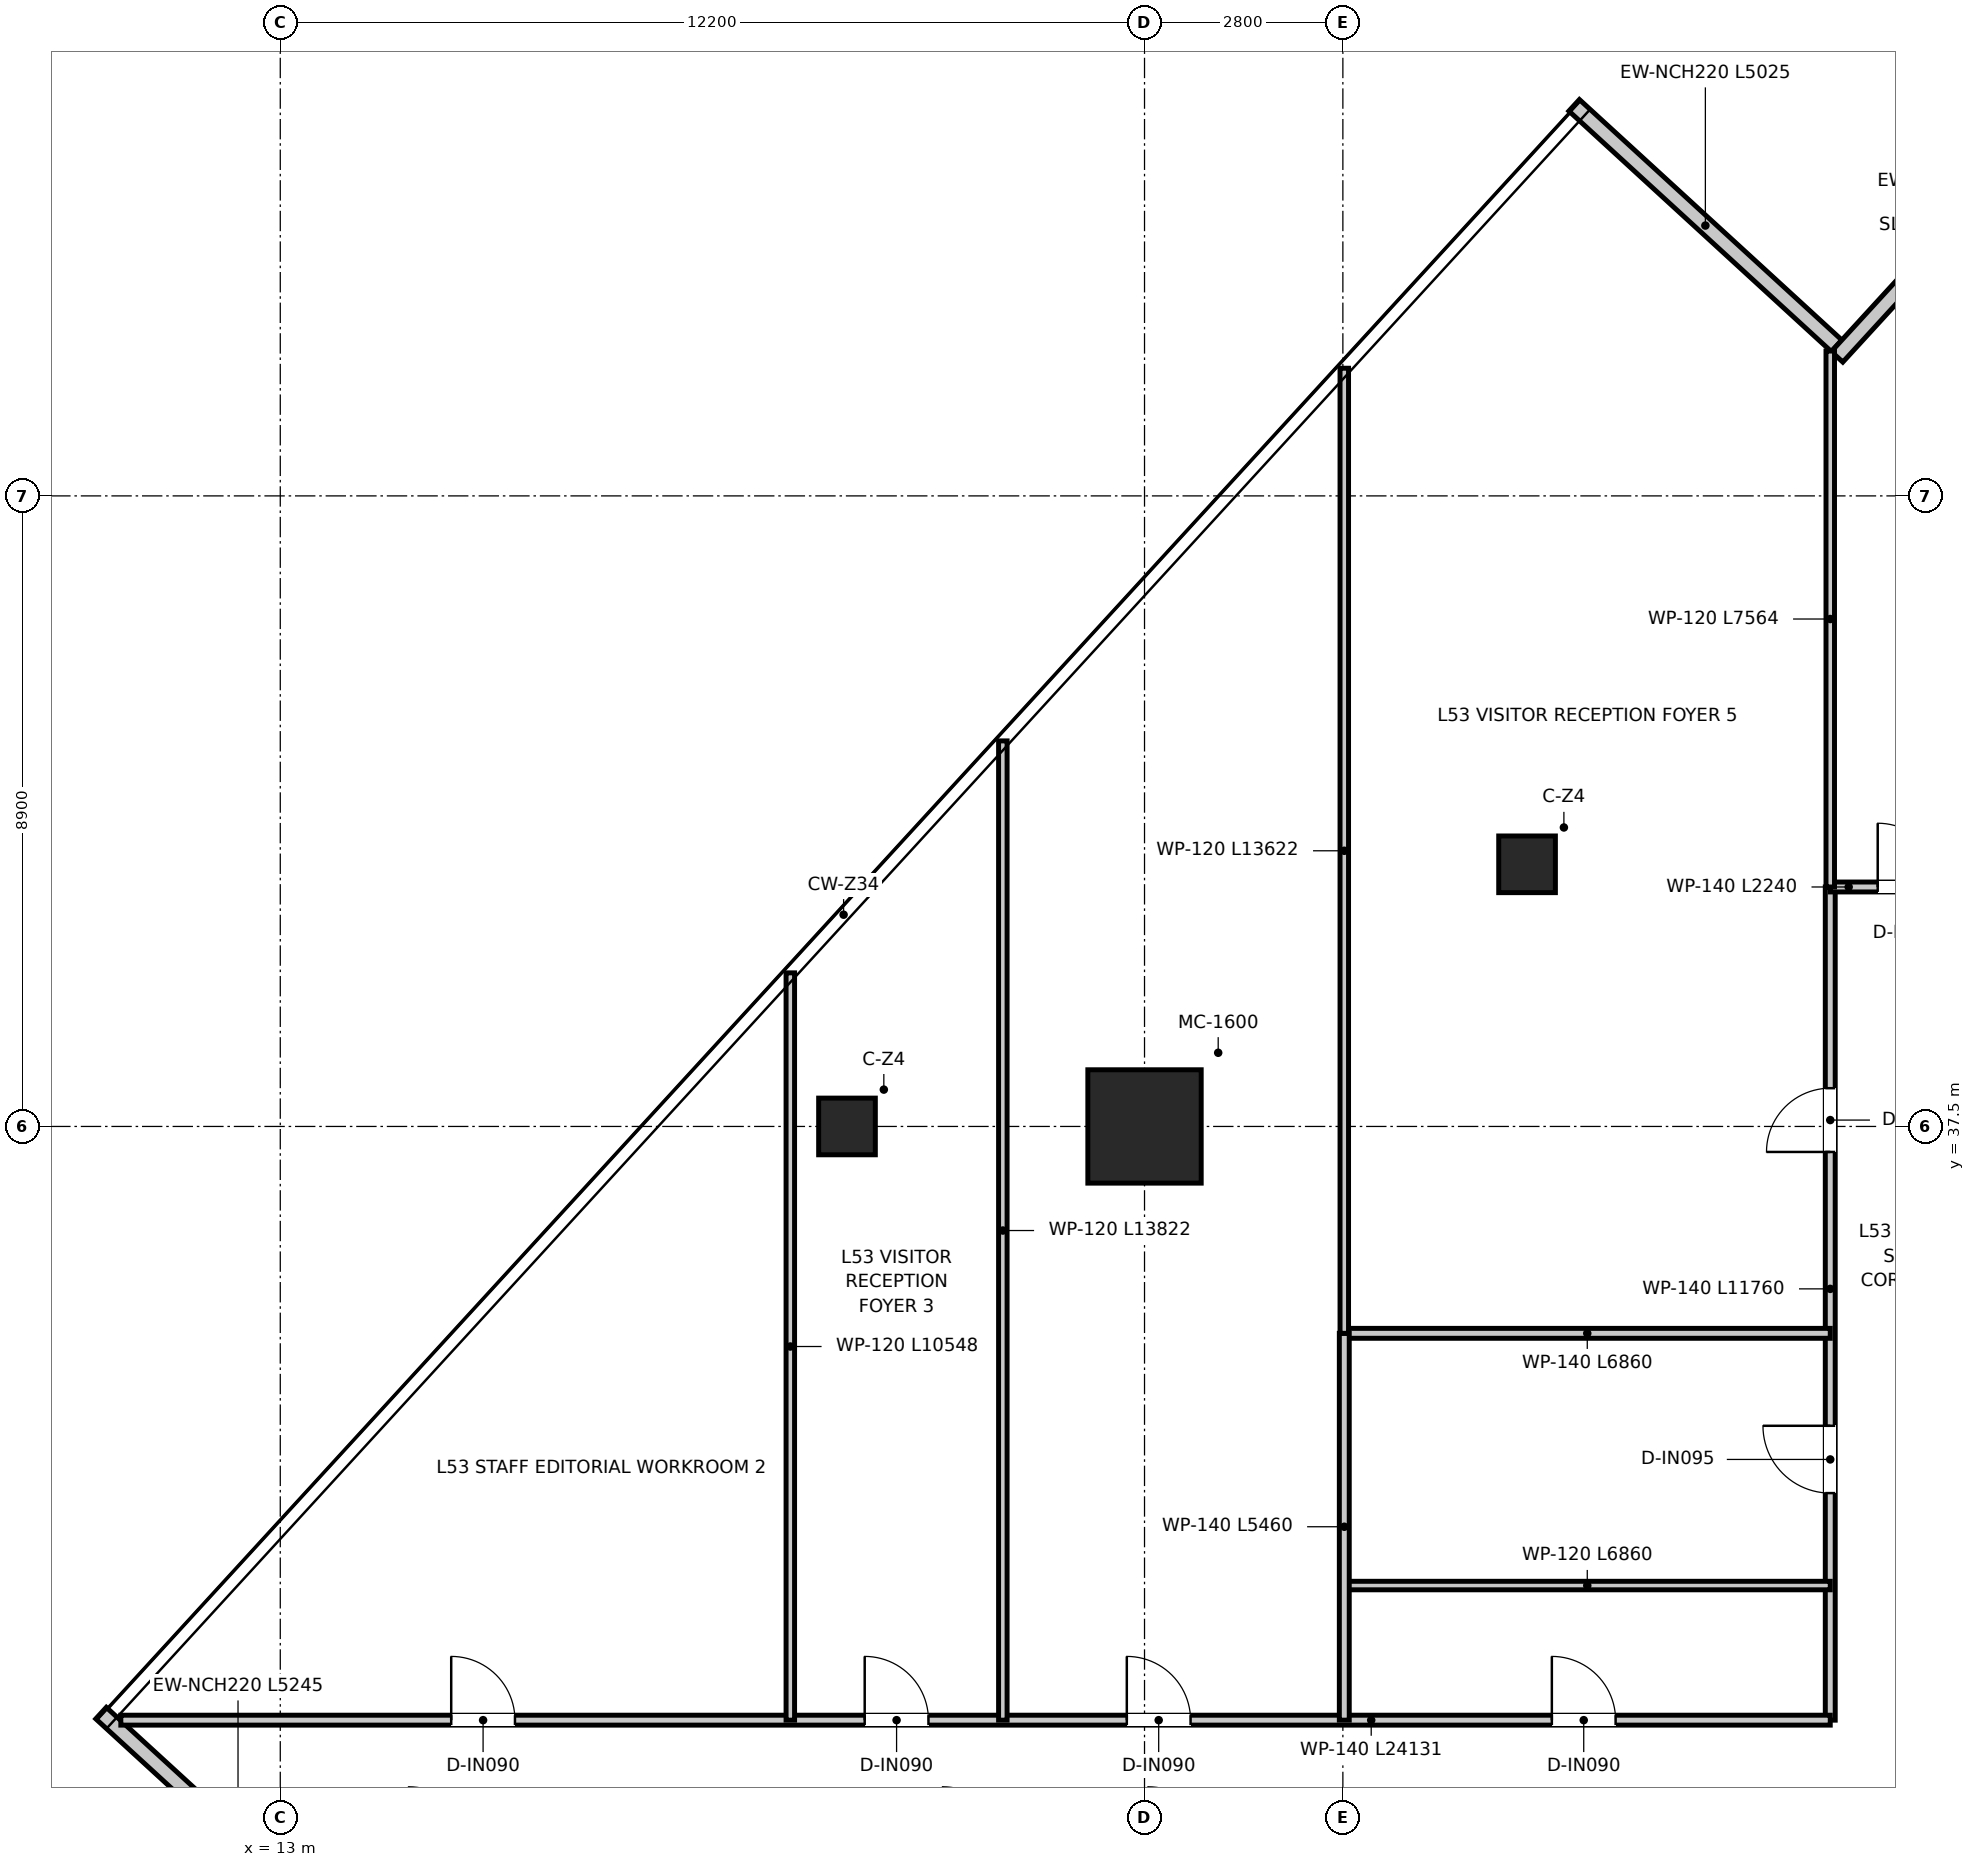
"""IFC4 building model, lengths in metres.
Left out: names, types, materials, properties, quantities, classifications, styles, units other than length and angle.
Written with IfcOpenShell. Run it as: python <this file> out.ifc"""

import sys

from ifc_helpers import new_model, si_unit, direction, frame, frame_2d, origin, origin_2d, place, context, subcontext, project, spatial, rectangle, extrude, source, transform, mapped, element, fill, save


model = new_model("IFC4")
c1 = context("Model", 3, precision=1e-05, world=origin(), true_north=direction((0.0, 1.0)))
c2 = subcontext(c1, "Body", "Model", "MODEL_VIEW")
j1 = project(units=[si_unit("LENGTHUNIT", "METRE"), si_unit("PLANEANGLEUNIT", "RADIAN")], contexts=[c1])
p1 = place(None, origin())
s1 = spatial("IfcSite", under=j1, at=p1, CompositionType="ELEMENT")
p2 = place(p1, origin())
s2 = spatial("IfcBuilding", under=s1, at=p2, CompositionType="ELEMENT")
p3 = place(p2, frame((0.0, 0.0, 219.15)))
s3 = spatial("IfcBuildingStorey", under=s2, at=p3, CompositionType="ELEMENT", Elevation=219.15)
m1 = source(origin(), c2, "Body", "SweptSolid", [
    extrude(rectangle(XDim=1.6, YDim=1.6, at=origin_2d()), origin(), (0.0, 0.0, 1.0), 3.95),
])
p4 = place(p3, frame((25.2, 37.5, 0.0), z_axis=(0.0, 0.0, 1.0), x_axis=(1.0, 0.0, 0.0)))
e1 = element("IfcColumn", 1, at=p4, inside=s3, PredefinedType="USERDEFINED", context=c2, shape_type="MappedRepresentation", body=[
    mapped(m1, transform((0.0, 0.0, 0.0), x_axis=(1.0, 0.0, 0.0), y_axis=(0.0, 1.0, 0.0), z_axis=(0.0, 0.0, 1.0), scale=1.0)),
])
m2 = source(origin(), c2, "Body", "SweptSolid", [
    extrude(rectangle(XDim=0.8, YDim=0.8, at=origin_2d()), origin(), (0.0, 0.0, 1.0), 3.95),
])
for number, where, z_axis, x_axis in (
    (2, (21.0, 37.5, 0.0), (0.0, 0.0, 1.0), (1.0, 0.0, 0.0)),
    (3, (30.6, 41.2, 0.0), (0.0, 0.0, 1.0), (1.0, 0.0, 0.0)),
):
    element("IfcColumn", number, at=place(p3, frame(where, z_axis=z_axis, x_axis=x_axis)), inside=s3, PredefinedType="COLUMN", context=c2, shape_type="MappedRepresentation", body=[
        mapped(m2, transform((0.0, 0.0, 0.0), x_axis=(1.0, 0.0, 0.0), y_axis=(0.0, 1.0, 0.0), z_axis=(0.0, 0.0, 1.0), scale=1.0)),
    ])
p5 = place(p3, frame((34.969, 48.518, 0.0), z_axis=(0.0, 0.0, 1.0), x_axis=(-0.737285215553, 0.675581609375, 0.0)))
e4 = element("IfcWall", 4, at=p5, inside=s3, PredefinedType="ELEMENTEDWALL", context=c2, shape_type="SweptSolid", body=[
    extrude(rectangle(XDim=5.025, YDim=0.22, at=frame_2d((2.512, 0.0))), origin(), (0.0, 0.0, 1.0), 3.67),
])
p6 = place(p3, frame((10.47, 29.22, 0.0), z_axis=(0.0, 0.0, 1.0), x_axis=(0.737293236511, -0.675572855727, 0.0)))
e5 = element("IfcWall", 5, at=p6, inside=s3, PredefinedType="ELEMENTEDWALL", context=c2, shape_type="SweptSolid", body=[
    extrude(rectangle(XDim=5.245, YDim=0.22, at=frame_2d((2.623, 0.0))), origin(), (0.0, 0.0, 1.0), 3.67),
])
p7 = place(p3, frame((38.52, 52.23, 0.0), z_axis=(0.0, 0.0, 1.0), x_axis=(-0.675596040677, -0.737271991752, 0.0)))
e6 = element("IfcWall", 6, at=p7, inside=s3, PredefinedType="ELEMENTEDWALL", context=c2, shape_type="SweptSolid", body=[
    extrude(rectangle(XDim=5.245, YDim=0.22, at=frame_2d((2.623, 0.0))), origin(), (0.0, 0.0, 1.0), 3.67),
])
p8 = place(p3, frame((34.88, 29.12, 0.0), z_axis=(0.0, 0.0, 1.0), x_axis=(0.0, 1.0, 0.0)))
e7 = element("IfcWall", 7, at=p8, inside=s3, PredefinedType="PARTITIONING", context=c2, shape_type="SweptSolid", body=[
    extrude(rectangle(XDim=11.76, YDim=0.14, at=frame_2d((5.88, 0.0))), origin(), (0.0, 0.0, 1.0), 3.03),
])
p9 = place(p8, frame((3.205, 0.0, 0.0)))
e8 = element("IfcOpeningElement", 8, at=p9, cuts=e7, PredefinedType="OPENING", context=c2, shape_type="SweptSolid", body=[
    extrude(rectangle(XDim=0.95, YDim=2.1, at=frame_2d((0.475, 1.05))), frame((0.0, 0.08, 0.0), z_axis=(0.0, -1.0, 0.0), x_axis=(1.0, 0.0, 0.0)), (0.0, 0.0, 1.0), 0.16),
])
p10 = place(p8, frame((8.02, 0.0, 0.0)))
e9 = element("IfcOpeningElement", 9, at=p10, cuts=e7, PredefinedType="OPENING", context=c2, shape_type="SweptSolid", body=[
    extrude(rectangle(XDim=0.9, YDim=2.1, at=frame_2d((0.45, 1.05))), frame((0.0, 0.08, 0.0), z_axis=(0.0, -1.0, 0.0), x_axis=(1.0, 0.0, 0.0)), (0.0, 0.0, 1.0), 0.16),
])
p11 = place(p3, frame((34.88, 40.88, 0.0), z_axis=(0.0, 0.0, 1.0), x_axis=(1.0, 0.0, 0.0)))
e10 = element("IfcWall", 10, at=p11, inside=s3, PredefinedType="PARTITIONING", context=c2, shape_type="SweptSolid", body=[
    extrude(rectangle(XDim=2.24, YDim=0.14, at=frame_2d((1.12, 0.0))), origin(), (0.0, 0.0, 1.0), 3.67),
])
p12 = place(p11, frame((0.67, 0.0, 0.0)))
e11 = element("IfcOpeningElement", 11, at=p12, cuts=e10, PredefinedType="OPENING", context=c2, shape_type="SweptSolid", body=[
    extrude(rectangle(XDim=0.9, YDim=2.1, at=frame_2d((0.45, 1.05))), frame((0.0, 0.08, 0.0), z_axis=(0.0, -1.0, 0.0), x_axis=(1.0, 0.0, 0.0)), (0.0, 0.0, 1.0), 0.16),
])
p13 = place(p3, frame((10.749, 29.12, 0.0), z_axis=(0.0, 0.0, 1.0), x_axis=(1.0, 0.0, 0.0)))
e12 = element("IfcWall", 12, at=p13, inside=s3, PredefinedType="PARTITIONING", context=c2, shape_type="SweptSolid", body=[
    extrude(rectangle(XDim=24.131, YDim=0.14, at=frame_2d((12.065, 0.0))), origin(), (0.0, 0.0, 1.0), 3.03),
])
p14 = place(p13, frame((20.201, 0.0, 0.0)))
e13 = element("IfcOpeningElement", 13, at=p14, cuts=e12, PredefinedType="OPENING", context=c2, shape_type="SweptSolid", body=[
    extrude(rectangle(XDim=0.9, YDim=2.1, at=frame_2d((0.45, 1.05))), frame((0.0, 0.08, 0.0), z_axis=(0.0, -1.0, 0.0), x_axis=(1.0, 0.0, 0.0)), (0.0, 0.0, 1.0), 0.16),
])
p15 = place(p13, frame((4.664, 0.0, 0.0)))
e14 = element("IfcOpeningElement", 14, at=p15, cuts=e12, PredefinedType="OPENING", context=c2, shape_type="SweptSolid", body=[
    extrude(rectangle(XDim=0.9, YDim=2.1, at=frame_2d((0.45, 1.05))), frame((0.0, 0.08, 0.0), z_axis=(0.0, -1.0, 0.0), x_axis=(1.0, 0.0, 0.0)), (0.0, 0.0, 1.0), 0.16),
])
p16 = place(p13, frame((10.501, 0.0, 0.0)))
e15 = element("IfcOpeningElement", 15, at=p16, cuts=e12, PredefinedType="OPENING", context=c2, shape_type="SweptSolid", body=[
    extrude(rectangle(XDim=0.9, YDim=2.1, at=frame_2d((0.45, 1.05))), frame((0.0, 0.08, 0.0), z_axis=(0.0, -1.0, 0.0), x_axis=(1.0, 0.0, 0.0)), (0.0, 0.0, 1.0), 0.16),
])
p17 = place(p13, frame((14.201, 0.0, 0.0)))
e16 = element("IfcOpeningElement", 16, at=p17, cuts=e12, PredefinedType="OPENING", context=c2, shape_type="SweptSolid", body=[
    extrude(rectangle(XDim=0.9, YDim=2.1, at=frame_2d((0.45, 1.05))), frame((0.0, 0.08, 0.0), z_axis=(0.0, -1.0, 0.0), x_axis=(1.0, 0.0, 0.0)), (0.0, 0.0, 1.0), 0.16),
])
p18 = place(p3, frame((28.02, 31.02, 0.0), z_axis=(0.0, 0.0, 1.0), x_axis=(1.0, 0.0, 0.0)))
e17 = element("IfcWall", 17, at=p18, inside=s3, PredefinedType="PARTITIONING", context=c2, shape_type="SweptSolid", body=[
    extrude(rectangle(XDim=6.86, YDim=0.12, at=frame_2d((3.43, 0.0))), origin(), (0.0, 0.0, 1.0), 3.18),
])
p19 = place(p3, frame((28.02, 34.58, 0.0), z_axis=(0.0, 0.0, 1.0), x_axis=(1.0, 0.0, 0.0)))
e18 = element("IfcWall", 18, at=p19, inside=s3, PredefinedType="PARTITIONING", context=c2, shape_type="SweptSolid", body=[
    extrude(rectangle(XDim=6.86, YDim=0.14, at=frame_2d((3.43, 0.0))), origin(), (0.0, 0.0, 1.0), 3.18),
])
p20 = place(p3, frame((28.02, 29.12, 0.0), z_axis=(0.0, 0.0, 1.0), x_axis=(0.0, 1.0, 0.0)))
e19 = element("IfcWall", 19, at=p20, inside=s3, PredefinedType="PARTITIONING", context=c2, shape_type="SweptSolid", body=[
    extrude(rectangle(XDim=5.46, YDim=0.14, at=frame_2d((2.73, 0.0))), origin(), (0.0, 0.0, 1.0), 3.37),
])
p21 = place(p3, frame((34.88, 40.88, 0.0), z_axis=(0.0, 0.0, 1.0), x_axis=(0.0, 1.0, 0.0)))
e20 = element("IfcWall", 20, at=p21, inside=s3, PredefinedType="PARTITIONING", context=c2, shape_type="SweptSolid", body=[
    extrude(rectangle(XDim=7.564, YDim=0.12, at=frame_2d((3.782, 0.0))), origin(), (0.0, 0.0, 1.0), 3.28),
])
p22 = place(p3, frame((20.2, 29.12, 0.0), z_axis=(0.0, 0.0, 1.0), x_axis=(0.0, 1.0, 0.0)))
e21 = element("IfcWall", 21, at=p22, inside=s3, PredefinedType="PARTITIONING", context=c2, shape_type="SweptSolid", body=[
    extrude(rectangle(XDim=10.548, YDim=0.12, at=frame_2d((5.274, 0.0))), origin(), (0.0, 0.0, 1.0), 3.67),
])
p23 = place(p3, frame((23.2, 29.12, 0.0), z_axis=(0.0, 0.0, 1.0), x_axis=(0.0, 1.0, 0.0)))
e22 = element("IfcWall", 22, at=p23, inside=s3, PredefinedType="PARTITIONING", context=c2, shape_type="SweptSolid", body=[
    extrude(rectangle(XDim=13.822, YDim=0.12, at=frame_2d((6.911, 0.0))), origin(), (0.0, 0.0, 1.0), 3.18),
])
p24 = place(p3, frame((28.02, 34.58, 0.0), z_axis=(0.0, 0.0, 1.0), x_axis=(0.0, 1.0, 0.0)))
e23 = element("IfcWall", 23, at=p24, inside=s3, PredefinedType="PARTITIONING", context=c2, shape_type="SweptSolid", body=[
    extrude(rectangle(XDim=13.622, YDim=0.12, at=frame_2d((6.811, 0.0))), origin(), (0.0, 0.0, 1.0), 3.03),
])
p25 = place(p14, origin())
e24 = element("IfcDoor", 24, at=p25, inside=s3, OperationType="SINGLE_SWING_LEFT", PredefinedType="DOOR", context=c2, shape_type="SweptSolid", body=[
    extrude(rectangle(XDim=0.9, YDim=2.1, at=frame_2d((0.45, 1.05))), frame((0.0, 0.025, 0.0), z_axis=(0.0, -1.0, 0.0), x_axis=(1.0, 0.0, 0.0)), (0.0, 0.0, 1.0), 0.05),
])
fill(e13, e24)
p26 = place(p9, origin())
e25 = element("IfcDoor", 25, at=p26, inside=s3, OperationType="SINGLE_SWING_RIGHT", PredefinedType="DOOR", context=c2, shape_type="SweptSolid", body=[
    extrude(rectangle(XDim=0.95, YDim=2.1, at=frame_2d((0.475, 1.05))), frame((0.0, 0.025, 0.0), z_axis=(0.0, -1.0, 0.0), x_axis=(1.0, 0.0, 0.0)), (0.0, 0.0, 1.0), 0.05),
])
fill(e8, e25)
p27 = place(p12, origin())
e26 = element("IfcDoor", 26, at=p27, inside=s3, OperationType="SINGLE_SWING_LEFT", PredefinedType="DOOR", context=c2, shape_type="SweptSolid", body=[
    extrude(rectangle(XDim=0.9, YDim=2.1, at=frame_2d((0.45, 1.05))), frame((0.0, 0.025, 0.0), z_axis=(0.0, -1.0, 0.0), x_axis=(1.0, 0.0, 0.0)), (0.0, 0.0, 1.0), 0.05),
])
fill(e11, e26)
p28 = place(p15, origin())
e27 = element("IfcDoor", 27, at=p28, inside=s3, OperationType="SINGLE_SWING_LEFT", PredefinedType="DOOR", context=c2, shape_type="SweptSolid", body=[
    extrude(rectangle(XDim=0.9, YDim=2.1, at=frame_2d((0.45, 1.05))), frame((0.0, 0.025, 0.0), z_axis=(0.0, -1.0, 0.0), x_axis=(1.0, 0.0, 0.0)), (0.0, 0.0, 1.0), 0.05),
])
fill(e14, e27)
p29 = place(p16, origin())
e28 = element("IfcDoor", 28, at=p29, inside=s3, OperationType="SINGLE_SWING_LEFT", PredefinedType="DOOR", context=c2, shape_type="SweptSolid", body=[
    extrude(rectangle(XDim=0.9, YDim=2.1, at=frame_2d((0.45, 1.05))), frame((0.0, 0.025, 0.0), z_axis=(0.0, -1.0, 0.0), x_axis=(1.0, 0.0, 0.0)), (0.0, 0.0, 1.0), 0.05),
])
fill(e15, e28)
p30 = place(p17, origin())
e29 = element("IfcDoor", 29, at=p30, inside=s3, OperationType="SINGLE_SWING_LEFT", PredefinedType="DOOR", context=c2, shape_type="SweptSolid", body=[
    extrude(rectangle(XDim=0.9, YDim=2.1, at=frame_2d((0.45, 1.05))), frame((0.0, 0.025, 0.0), z_axis=(0.0, -1.0, 0.0), x_axis=(1.0, 0.0, 0.0)), (0.0, 0.0, 1.0), 0.05),
])
fill(e16, e29)
p31 = place(p10, origin())
e30 = element("IfcDoor", 30, at=p31, inside=s3, OperationType="SINGLE_SWING_LEFT", PredefinedType="DOOR", context=c2, shape_type="SweptSolid", body=[
    extrude(rectangle(XDim=0.9, YDim=2.1, at=frame_2d((0.45, 1.05))), frame((0.0, 0.025, 0.0), z_axis=(0.0, -1.0, 0.0), x_axis=(1.0, 0.0, 0.0)), (0.0, 0.0, 1.0), 0.05),
])
fill(e9, e30)
save(model, sys.argv[1])
